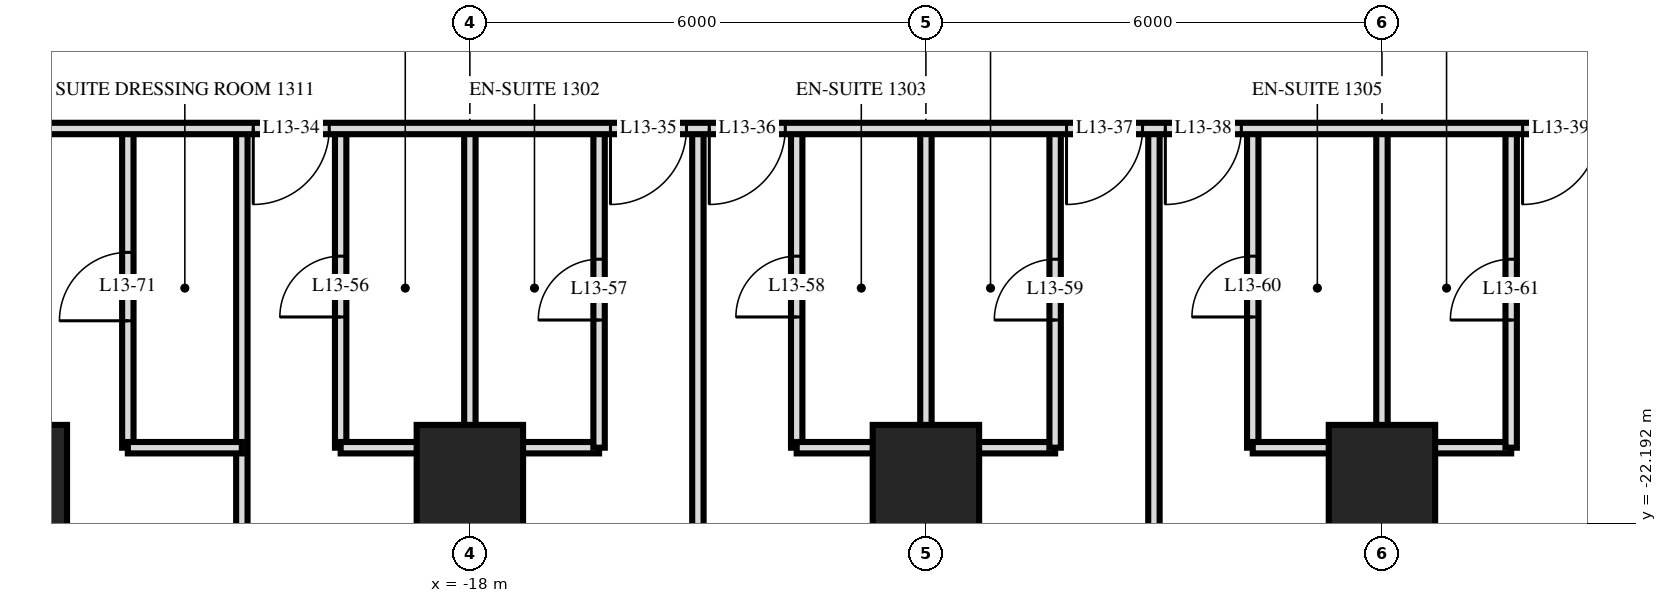
"""IFC4 building model, lengths in metres.
Left out: names, types, materials, properties, quantities, classifications, styles, units other than length and angle.
Written with IfcOpenShell. Run it as: python <this file> out.ifc"""

import sys

from ifc_helpers import new_model, si_unit, direction, frame, frame_2d, origin, origin_2d, place, context, subcontext, project, spatial, rectangle, extrude, element, fill, save


model = new_model("IFC4")
c1 = context("Model", 3, precision=1e-05, world=origin(), true_north=direction((0.0, 1.0)))
c2 = subcontext(c1, "Body", "Model", "MODEL_VIEW")
j1 = project(units=[si_unit("LENGTHUNIT", "METRE"), si_unit("PLANEANGLEUNIT", "RADIAN")], contexts=[c1])
p1 = place(None, origin())
s1 = spatial("IfcSite", under=j1, at=p1, CompositionType="ELEMENT")
p2 = place(p1, origin())
s2 = spatial("IfcBuilding", under=s1, at=p2, CompositionType="ELEMENT")
p3 = place(p2, frame((0.0, 0.0, 56.4)))
s3 = spatial("IfcBuildingStorey", under=s2, at=p3, CompositionType="ELEMENT", Elevation=56.4)
for number, where, z_axis, x_axis in (
    (1, (-24.0, -21.6, 0.0), (0.0, 0.0, 1.0), (1.0, 0.0, 0.0)),
    (2, (-18.0, -21.6, 0.0), (0.0, 0.0, 1.0), (1.0, 0.0, 0.0)),
    (3, (-12.0, -21.6, 0.0), (0.0, 0.0, 1.0), (1.0, 0.0, 0.0)),
    (4, (-6.0, -21.6, 0.0), (0.0, 0.0, 1.0), (1.0, 0.0, 0.0)),
):
    element("IfcColumn", number, at=place(p3, frame(where, z_axis=z_axis, x_axis=x_axis)), inside=s3, PredefinedType="COLUMN", context=c2, shape_type="SweptSolid", body=[
        extrude(rectangle(XDim=1.4, YDim=1.4, at=origin_2d()), origin(), (0.0, 0.0, 1.0), 3.6),
    ])
p4 = place(p3, frame((-4.3, -21.2, 0.0), z_axis=(0.0, 0.0, 1.0), x_axis=(0.0, 1.0, 0.0)))
e5 = element("IfcWall", 5, at=p4, inside=s3, PredefinedType="PARTITIONING", context=c2, shape_type="SweptSolid", body=[
    extrude(rectangle(XDim=4.2, YDim=0.15, at=frame_2d((2.1, 0.0))), origin(), (0.0, 0.0, 1.0), 3.32),
])
p5 = place(p4, frame((1.68, 0.0, 0.0)))
e6 = element("IfcOpeningElement", 6, at=p5, cuts=e5, PredefinedType="OPENING", context=c2, shape_type="SweptSolid", body=[
    extrude(rectangle(XDim=0.8, YDim=2.1, at=frame_2d((0.4, 1.05))), frame((0.0, 0.085, 0.0), z_axis=(0.0, -1.0, 0.0), x_axis=(1.0, 0.0, 0.0)), (0.0, 0.0, 1.0), 0.17),
])
p6 = place(p3, frame((-6.0, -29.22, 0.0), z_axis=(0.0, 0.0, 1.0), x_axis=(0.0, 1.0, 0.0)))
e7 = element("IfcWall", 7, at=p6, inside=s3, PredefinedType="PARTITIONING", context=c2, shape_type="SweptSolid", body=[
    extrude(rectangle(XDim=12.22, YDim=0.15, at=frame_2d((6.11, 0.0))), origin(), (0.0, 0.0, 1.0), 3.32),
])
p7 = place(p3, frame((-7.7, -21.2, 0.0), z_axis=(0.0, 0.0, 1.0), x_axis=(0.0, 1.0, 0.0)))
e8 = element("IfcWall", 8, at=p7, inside=s3, PredefinedType="PARTITIONING", context=c2, shape_type="SweptSolid", body=[
    extrude(rectangle(XDim=4.2, YDim=0.15, at=frame_2d((2.1, 0.0))), origin(), (0.0, 0.0, 1.0), 3.32),
])
p8 = place(p7, frame((1.72, 0.0, 0.0)))
e9 = element("IfcOpeningElement", 9, at=p8, cuts=e8, PredefinedType="OPENING", context=c2, shape_type="SweptSolid", body=[
    extrude(rectangle(XDim=0.8, YDim=2.1, at=frame_2d((0.4, 1.05))), frame((0.0, 0.085, 0.0), z_axis=(0.0, -1.0, 0.0), x_axis=(1.0, 0.0, 0.0)), (0.0, 0.0, 1.0), 0.17),
])
p9 = place(p3, frame((-9.0, -29.22, 0.0), z_axis=(0.0, 0.0, 1.0), x_axis=(0.0, 1.0, 0.0)))
e10 = element("IfcWall", 10, at=p9, inside=s3, PredefinedType="PARTITIONING", context=c2, shape_type="SweptSolid", body=[
    extrude(rectangle(XDim=12.22, YDim=0.15, at=frame_2d((6.11, 0.0))), origin(), (0.0, 0.0, 1.0), 3.32),
])
p10 = place(p3, frame((-10.3, -21.2, 0.0), z_axis=(0.0, 0.0, 1.0), x_axis=(0.0, 1.0, 0.0)))
e11 = element("IfcWall", 11, at=p10, inside=s3, PredefinedType="PARTITIONING", context=c2, shape_type="SweptSolid", body=[
    extrude(rectangle(XDim=4.2, YDim=0.15, at=frame_2d((2.1, 0.0))), origin(), (0.0, 0.0, 1.0), 3.32),
])
p11 = place(p10, frame((1.68, 0.0, 0.0)))
e12 = element("IfcOpeningElement", 12, at=p11, cuts=e11, PredefinedType="OPENING", context=c2, shape_type="SweptSolid", body=[
    extrude(rectangle(XDim=0.8, YDim=2.1, at=frame_2d((0.4, 1.05))), frame((0.0, 0.085, 0.0), z_axis=(0.0, -1.0, 0.0), x_axis=(1.0, 0.0, 0.0)), (0.0, 0.0, 1.0), 0.17),
])
p12 = place(p3, frame((-12.0, -29.22, 0.0), z_axis=(0.0, 0.0, 1.0), x_axis=(0.0, 1.0, 0.0)))
e13 = element("IfcWall", 13, at=p12, inside=s3, PredefinedType="PARTITIONING", context=c2, shape_type="SweptSolid", body=[
    extrude(rectangle(XDim=12.22, YDim=0.15, at=frame_2d((6.11, 0.0))), origin(), (0.0, 0.0, 1.0), 3.32),
])
p13 = place(p3, frame((-13.7, -21.2, 0.0), z_axis=(0.0, 0.0, 1.0), x_axis=(0.0, 1.0, 0.0)))
e14 = element("IfcWall", 14, at=p13, inside=s3, PredefinedType="PARTITIONING", context=c2, shape_type="SweptSolid", body=[
    extrude(rectangle(XDim=4.2, YDim=0.15, at=frame_2d((2.1, 0.0))), origin(), (0.0, 0.0, 1.0), 3.32),
])
p14 = place(p13, frame((1.72, 0.0, 0.0)))
e15 = element("IfcOpeningElement", 15, at=p14, cuts=e14, PredefinedType="OPENING", context=c2, shape_type="SweptSolid", body=[
    extrude(rectangle(XDim=0.8, YDim=2.1, at=frame_2d((0.4, 1.05))), frame((0.0, 0.085, 0.0), z_axis=(0.0, -1.0, 0.0), x_axis=(1.0, 0.0, 0.0)), (0.0, 0.0, 1.0), 0.17),
])
p15 = place(p3, frame((-15.0, -29.22, 0.0), z_axis=(0.0, 0.0, 1.0), x_axis=(0.0, 1.0, 0.0)))
e16 = element("IfcWall", 16, at=p15, inside=s3, PredefinedType="PARTITIONING", context=c2, shape_type="SweptSolid", body=[
    extrude(rectangle(XDim=12.22, YDim=0.15, at=frame_2d((6.11, 0.0))), origin(), (0.0, 0.0, 1.0), 3.32),
])
p16 = place(p3, frame((-16.3, -21.2, 0.0), z_axis=(0.0, 0.0, 1.0), x_axis=(0.0, 1.0, 0.0)))
e17 = element("IfcWall", 17, at=p16, inside=s3, PredefinedType="PARTITIONING", context=c2, shape_type="SweptSolid", body=[
    extrude(rectangle(XDim=4.2, YDim=0.15, at=frame_2d((2.1, 0.0))), origin(), (0.0, 0.0, 1.0), 3.32),
])
p17 = place(p16, frame((1.68, 0.0, 0.0)))
e18 = element("IfcOpeningElement", 18, at=p17, cuts=e17, PredefinedType="OPENING", context=c2, shape_type="SweptSolid", body=[
    extrude(rectangle(XDim=0.8, YDim=2.1, at=frame_2d((0.4, 1.05))), frame((0.0, 0.085, 0.0), z_axis=(0.0, -1.0, 0.0), x_axis=(1.0, 0.0, 0.0)), (0.0, 0.0, 1.0), 0.17),
])
p18 = place(p3, frame((-18.0, -29.22, 0.0), z_axis=(0.0, 0.0, 1.0), x_axis=(0.0, 1.0, 0.0)))
e19 = element("IfcWall", 19, at=p18, inside=s3, PredefinedType="PARTITIONING", context=c2, shape_type="SweptSolid", body=[
    extrude(rectangle(XDim=12.22, YDim=0.15, at=frame_2d((6.11, 0.0))), origin(), (0.0, 0.0, 1.0), 3.32),
])
p19 = place(p3, frame((-19.7, -21.2, 0.0), z_axis=(0.0, 0.0, 1.0), x_axis=(0.0, 1.0, 0.0)))
e20 = element("IfcWall", 20, at=p19, inside=s3, PredefinedType="PARTITIONING", context=c2, shape_type="SweptSolid", body=[
    extrude(rectangle(XDim=4.2, YDim=0.15, at=frame_2d((2.1, 0.0))), origin(), (0.0, 0.0, 1.0), 3.32),
])
p20 = place(p19, frame((1.72, 0.0, 0.0)))
e21 = element("IfcOpeningElement", 21, at=p20, cuts=e20, PredefinedType="OPENING", context=c2, shape_type="SweptSolid", body=[
    extrude(rectangle(XDim=0.8, YDim=2.1, at=frame_2d((0.4, 1.05))), frame((0.0, 0.085, 0.0), z_axis=(0.0, -1.0, 0.0), x_axis=(1.0, 0.0, 0.0)), (0.0, 0.0, 1.0), 0.17),
])
p21 = place(p3, frame((-21.0, -29.22, 0.0), z_axis=(0.0, 0.0, 1.0), x_axis=(0.0, 1.0, 0.0)))
e22 = element("IfcWall", 22, at=p21, inside=s3, PredefinedType="PARTITIONING", context=c2, shape_type="SweptSolid", body=[
    extrude(rectangle(XDim=12.22, YDim=0.15, at=frame_2d((6.11, 0.0))), origin(), (0.0, 0.0, 1.0), 3.32),
])
p22 = place(p3, frame((-22.5, -21.2, 0.0), z_axis=(0.0, 0.0, 1.0), x_axis=(0.0, 1.0, 0.0)))
e23 = element("IfcWall", 23, at=p22, inside=s3, PredefinedType="PARTITIONING", context=c2, shape_type="SweptSolid", body=[
    extrude(rectangle(XDim=4.2, YDim=0.15, at=frame_2d((2.1, 0.0))), origin(), (0.0, 0.0, 1.0), 3.32),
])
p23 = place(p22, frame((1.67, 0.0, 0.0)))
e24 = element("IfcOpeningElement", 24, at=p23, cuts=e23, PredefinedType="OPENING", context=c2, shape_type="SweptSolid", body=[
    extrude(rectangle(XDim=0.9, YDim=2.1, at=frame_2d((0.45, 1.05))), frame((0.0, 0.085, 0.0), z_axis=(0.0, -1.0, 0.0), x_axis=(1.0, 0.0, 0.0)), (0.0, 0.0, 1.0), 0.17),
])
p24 = place(p3, frame((-22.5, -21.2, 0.0), z_axis=(0.0, 0.0, 1.0), x_axis=(1.0, 0.0, 0.0)))
e25 = element("IfcWall", 25, at=p24, inside=s3, PredefinedType="PARTITIONING", context=c2, shape_type="SweptSolid", body=[
    extrude(rectangle(XDim=1.5, YDim=0.15, at=frame_2d((0.75, 0.0))), origin(), (0.0, 0.0, 1.0), 3.32),
])
for number, where, z_axis, x_axis in (
    (26, (-19.7, -21.2, 0.0), (0.0, 0.0, 1.0), (1.0, 0.0, 0.0)),
    (27, (-13.7, -21.2, 0.0), (0.0, 0.0, 1.0), (1.0, 0.0, 0.0)),
    (28, (-7.7, -21.2, 0.0), (0.0, 0.0, 1.0), (1.0, 0.0, 0.0)),
):
    element("IfcWall", number, at=place(p3, frame(where, z_axis=z_axis, x_axis=x_axis)), inside=s3, PredefinedType="PARTITIONING", context=c2, shape_type="SweptSolid", body=[
        extrude(rectangle(XDim=3.4, YDim=0.15, at=frame_2d((1.7, 0.0))), origin(), (0.0, 0.0, 1.0), 3.32),
    ])
p25 = place(p3, frame((-33.12, -17.0, 0.0), z_axis=(0.0, 0.0, 1.0), x_axis=(1.0, 0.0, 0.0)))
e29 = element("IfcWall", 29, at=p25, inside=s3, PredefinedType="PARTITIONING", context=c2, shape_type="SweptSolid", body=[
    extrude(rectangle(XDim=66.24, YDim=0.15, at=frame_2d((33.12, 0.0))), origin(), (0.0, 0.0, 1.0), 3.32),
])
p26 = place(p25, frame((12.27, 0.0, 0.0)))
e30 = element("IfcOpeningElement", 30, at=p26, cuts=e29, PredefinedType="OPENING", context=c2, shape_type="SweptSolid", body=[
    extrude(rectangle(XDim=1.0, YDim=2.1, at=frame_2d((0.5, 1.05))), frame((0.0, 0.085, 0.0), z_axis=(0.0, -1.0, 0.0), x_axis=(1.0, 0.0, 0.0)), (0.0, 0.0, 1.0), 0.17),
])
p27 = place(p25, frame((16.97, 0.0, 0.0)))
e31 = element("IfcOpeningElement", 31, at=p27, cuts=e29, PredefinedType="OPENING", context=c2, shape_type="SweptSolid", body=[
    extrude(rectangle(XDim=1.0, YDim=2.1, at=frame_2d((0.5, 1.05))), frame((0.0, 0.085, 0.0), z_axis=(0.0, -1.0, 0.0), x_axis=(1.0, 0.0, 0.0)), (0.0, 0.0, 1.0), 0.17),
])
p28 = place(p25, frame((18.27, 0.0, 0.0)))
e32 = element("IfcOpeningElement", 32, at=p28, cuts=e29, PredefinedType="OPENING", context=c2, shape_type="SweptSolid", body=[
    extrude(rectangle(XDim=1.0, YDim=2.1, at=frame_2d((0.5, 1.05))), frame((0.0, 0.085, 0.0), z_axis=(0.0, -1.0, 0.0), x_axis=(1.0, 0.0, 0.0)), (0.0, 0.0, 1.0), 0.17),
])
p29 = place(p25, frame((22.97, 0.0, 0.0)))
e33 = element("IfcOpeningElement", 33, at=p29, cuts=e29, PredefinedType="OPENING", context=c2, shape_type="SweptSolid", body=[
    extrude(rectangle(XDim=1.0, YDim=2.1, at=frame_2d((0.5, 1.05))), frame((0.0, 0.085, 0.0), z_axis=(0.0, -1.0, 0.0), x_axis=(1.0, 0.0, 0.0)), (0.0, 0.0, 1.0), 0.17),
])
p30 = place(p25, frame((24.27, 0.0, 0.0)))
e34 = element("IfcOpeningElement", 34, at=p30, cuts=e29, PredefinedType="OPENING", context=c2, shape_type="SweptSolid", body=[
    extrude(rectangle(XDim=1.0, YDim=2.1, at=frame_2d((0.5, 1.05))), frame((0.0, 0.085, 0.0), z_axis=(0.0, -1.0, 0.0), x_axis=(1.0, 0.0, 0.0)), (0.0, 0.0, 1.0), 0.17),
])
p31 = place(p25, frame((28.97, 0.0, 0.0)))
e35 = element("IfcOpeningElement", 35, at=p31, cuts=e29, PredefinedType="OPENING", context=c2, shape_type="SweptSolid", body=[
    extrude(rectangle(XDim=1.0, YDim=2.1, at=frame_2d((0.5, 1.05))), frame((0.0, 0.085, 0.0), z_axis=(0.0, -1.0, 0.0), x_axis=(1.0, 0.0, 0.0)), (0.0, 0.0, 1.0), 0.17),
])
p32 = place(p25, frame((30.27, 0.0, 0.0)))
e36 = element("IfcOpeningElement", 36, at=p32, cuts=e29, PredefinedType="OPENING", context=c2, shape_type="SweptSolid", body=[
    extrude(rectangle(XDim=1.0, YDim=2.1, at=frame_2d((0.5, 1.05))), frame((0.0, 0.085, 0.0), z_axis=(0.0, -1.0, 0.0), x_axis=(1.0, 0.0, 0.0)), (0.0, 0.0, 1.0), 0.17),
])
p33 = place(p25, frame((33.82, 0.0, 0.0)))
e37 = element("IfcOpeningElement", 37, at=p33, cuts=e29, PredefinedType="OPENING", context=c2, shape_type="SweptSolid", body=[
    extrude(rectangle(XDim=1.0, YDim=2.1, at=frame_2d((0.5, 1.05))), frame((0.0, 0.085, 0.0), z_axis=(0.0, -1.0, 0.0), x_axis=(1.0, 0.0, 0.0)), (0.0, 0.0, 1.0), 0.17),
])
p34 = place(p25, frame((46.27, 0.0, 0.0)))
e38 = element("IfcOpeningElement", 38, at=p34, cuts=e29, PredefinedType="OPENING", context=c2, shape_type="SweptSolid", body=[
    extrude(rectangle(XDim=1.0, YDim=2.1, at=frame_2d((0.5, 1.05))), frame((0.0, 0.085, 0.0), z_axis=(0.0, -1.0, 0.0), x_axis=(1.0, 0.0, 0.0)), (0.0, 0.0, 1.0), 0.17),
])
p35 = place(p25, frame((52.97, 0.0, 0.0)))
e39 = element("IfcOpeningElement", 39, at=p35, cuts=e29, PredefinedType="OPENING", context=c2, shape_type="SweptSolid", body=[
    extrude(rectangle(XDim=1.0, YDim=2.1, at=frame_2d((0.5, 1.05))), frame((0.0, 0.085, 0.0), z_axis=(0.0, -1.0, 0.0), x_axis=(1.0, 0.0, 0.0)), (0.0, 0.0, 1.0), 0.17),
])
p36 = place(p25, frame((6.05, 0.0, 0.0)))
e40 = element("IfcOpeningElement", 40, at=p36, cuts=e29, PredefinedType="OPENING", context=c2, shape_type="SweptSolid", body=[
    extrude(rectangle(XDim=1.0, YDim=2.1, at=frame_2d((0.5, 1.05))), frame((0.0, 0.085, 0.0), z_axis=(0.0, -1.0, 0.0), x_axis=(1.0, 0.0, 0.0)), (0.0, 0.0, 1.0), 0.17),
])
p37 = place(p25, frame((59.15, 0.0, 0.0)))
e41 = element("IfcOpeningElement", 41, at=p37, cuts=e29, PredefinedType="OPENING", context=c2, shape_type="SweptSolid", body=[
    extrude(rectangle(XDim=1.0, YDim=2.1, at=frame_2d((0.5, 1.05))), frame((0.0, 0.085, 0.0), z_axis=(0.0, -1.0, 0.0), x_axis=(1.0, 0.0, 0.0)), (0.0, 0.0, 1.0), 0.17),
])
p38 = place(p26, frame((0.5, 0.0, 0.0), z_axis=(0.0, 0.0, 1.0), x_axis=(-1.0, 0.0, 0.0)))
e42 = element("IfcDoor", 42, at=p38, inside=s3, OperationType="SINGLE_SWING_LEFT", PredefinedType="DOOR", context=c2, shape_type="SweptSolid", body=[
    extrude(rectangle(XDim=1.0, YDim=2.1, at=frame_2d((0.0, 1.05))), frame((0.0, -0.025, 0.0), z_axis=(0.0, 1.0, 0.0), x_axis=(-1.0, 0.0, 0.0)), (0.0, 0.0, 1.0), 0.05),
])
fill(e30, e42)
p39 = place(p27, frame((0.5, 0.0, 0.0), z_axis=(0.0, 0.0, 1.0), x_axis=(-1.0, 0.0, 0.0)))
e43 = element("IfcDoor", 43, at=p39, inside=s3, OperationType="SINGLE_SWING_LEFT", PredefinedType="DOOR", context=c2, shape_type="SweptSolid", body=[
    extrude(rectangle(XDim=1.0, YDim=2.1, at=frame_2d((0.0, 1.05))), frame((0.0, -0.025, 0.0), z_axis=(0.0, 1.0, 0.0), x_axis=(-1.0, 0.0, 0.0)), (0.0, 0.0, 1.0), 0.05),
])
fill(e31, e43)
p40 = place(p28, frame((0.5, 0.0, 0.0), z_axis=(0.0, 0.0, 1.0), x_axis=(-1.0, 0.0, 0.0)))
e44 = element("IfcDoor", 44, at=p40, inside=s3, OperationType="SINGLE_SWING_LEFT", PredefinedType="DOOR", context=c2, shape_type="SweptSolid", body=[
    extrude(rectangle(XDim=1.0, YDim=2.1, at=frame_2d((0.0, 1.05))), frame((0.0, -0.025, 0.0), z_axis=(0.0, 1.0, 0.0), x_axis=(-1.0, 0.0, 0.0)), (0.0, 0.0, 1.0), 0.05),
])
fill(e32, e44)
p41 = place(p29, frame((0.5, 0.0, 0.0), z_axis=(0.0, 0.0, 1.0), x_axis=(-1.0, 0.0, 0.0)))
e45 = element("IfcDoor", 45, at=p41, inside=s3, OperationType="SINGLE_SWING_LEFT", PredefinedType="DOOR", context=c2, shape_type="SweptSolid", body=[
    extrude(rectangle(XDim=1.0, YDim=2.1, at=frame_2d((0.0, 1.05))), frame((0.0, -0.025, 0.0), z_axis=(0.0, 1.0, 0.0), x_axis=(-1.0, 0.0, 0.0)), (0.0, 0.0, 1.0), 0.05),
])
fill(e33, e45)
p42 = place(p30, frame((0.5, 0.0, 0.0), z_axis=(0.0, 0.0, 1.0), x_axis=(-1.0, 0.0, 0.0)))
e46 = element("IfcDoor", 46, at=p42, inside=s3, OperationType="SINGLE_SWING_LEFT", PredefinedType="DOOR", context=c2, shape_type="SweptSolid", body=[
    extrude(rectangle(XDim=1.0, YDim=2.1, at=frame_2d((0.0, 1.05))), frame((0.0, -0.025, 0.0), z_axis=(0.0, 1.0, 0.0), x_axis=(-1.0, 0.0, 0.0)), (0.0, 0.0, 1.0), 0.05),
])
fill(e34, e46)
p43 = place(p31, frame((0.5, 0.0, 0.0), z_axis=(0.0, 0.0, 1.0), x_axis=(-1.0, 0.0, 0.0)))
e47 = element("IfcDoor", 47, at=p43, inside=s3, OperationType="SINGLE_SWING_LEFT", PredefinedType="DOOR", context=c2, shape_type="SweptSolid", body=[
    extrude(rectangle(XDim=1.0, YDim=2.1, at=frame_2d((0.0, 1.05))), frame((0.0, -0.025, 0.0), z_axis=(0.0, 1.0, 0.0), x_axis=(-1.0, 0.0, 0.0)), (0.0, 0.0, 1.0), 0.05),
])
fill(e35, e47)
p44 = place(p20, origin())
e48 = element("IfcDoor", 48, at=p44, inside=s3, OperationType="SINGLE_SWING_RIGHT", PredefinedType="DOOR", context=c2, shape_type="SweptSolid", body=[
    extrude(rectangle(XDim=0.8, YDim=2.1, at=frame_2d((0.4, 1.05))), frame((0.0, 0.025, 0.0), z_axis=(0.0, -1.0, 0.0), x_axis=(1.0, 0.0, 0.0)), (0.0, 0.0, 1.0), 0.05),
])
fill(e21, e48)
p45 = place(p17, origin())
e49 = element("IfcDoor", 49, at=p45, inside=s3, OperationType="SINGLE_SWING_RIGHT", PredefinedType="DOOR", context=c2, shape_type="SweptSolid", body=[
    extrude(rectangle(XDim=0.8, YDim=2.1, at=frame_2d((0.4, 1.05))), frame((0.0, 0.025, 0.0), z_axis=(0.0, -1.0, 0.0), x_axis=(1.0, 0.0, 0.0)), (0.0, 0.0, 1.0), 0.05),
])
fill(e18, e49)
p46 = place(p14, origin())
e50 = element("IfcDoor", 50, at=p46, inside=s3, OperationType="SINGLE_SWING_RIGHT", PredefinedType="DOOR", context=c2, shape_type="SweptSolid", body=[
    extrude(rectangle(XDim=0.8, YDim=2.1, at=frame_2d((0.4, 1.05))), frame((0.0, 0.025, 0.0), z_axis=(0.0, -1.0, 0.0), x_axis=(1.0, 0.0, 0.0)), (0.0, 0.0, 1.0), 0.05),
])
fill(e15, e50)
p47 = place(p11, origin())
e51 = element("IfcDoor", 51, at=p47, inside=s3, OperationType="SINGLE_SWING_RIGHT", PredefinedType="DOOR", context=c2, shape_type="SweptSolid", body=[
    extrude(rectangle(XDim=0.8, YDim=2.1, at=frame_2d((0.4, 1.05))), frame((0.0, 0.025, 0.0), z_axis=(0.0, -1.0, 0.0), x_axis=(1.0, 0.0, 0.0)), (0.0, 0.0, 1.0), 0.05),
])
fill(e12, e51)
p48 = place(p8, origin())
e52 = element("IfcDoor", 52, at=p48, inside=s3, OperationType="SINGLE_SWING_RIGHT", PredefinedType="DOOR", context=c2, shape_type="SweptSolid", body=[
    extrude(rectangle(XDim=0.8, YDim=2.1, at=frame_2d((0.4, 1.05))), frame((0.0, 0.025, 0.0), z_axis=(0.0, -1.0, 0.0), x_axis=(1.0, 0.0, 0.0)), (0.0, 0.0, 1.0), 0.05),
])
fill(e9, e52)
p49 = place(p5, origin())
e53 = element("IfcDoor", 53, at=p49, inside=s3, OperationType="SINGLE_SWING_RIGHT", PredefinedType="DOOR", context=c2, shape_type="SweptSolid", body=[
    extrude(rectangle(XDim=0.8, YDim=2.1, at=frame_2d((0.4, 1.05))), frame((0.0, 0.025, 0.0), z_axis=(0.0, -1.0, 0.0), x_axis=(1.0, 0.0, 0.0)), (0.0, 0.0, 1.0), 0.05),
])
fill(e6, e53)
p50 = place(p23, origin())
e54 = element("IfcDoor", 54, at=p50, inside=s3, OperationType="SINGLE_SWING_RIGHT", PredefinedType="DOOR", context=c2, shape_type="SweptSolid", body=[
    extrude(rectangle(XDim=0.9, YDim=2.1, at=frame_2d((0.45, 1.05))), frame((0.0, 0.025, 0.0), z_axis=(0.0, -1.0, 0.0), x_axis=(1.0, 0.0, 0.0)), (0.0, 0.0, 1.0), 0.05),
])
fill(e24, e54)
save(model, sys.argv[1])
